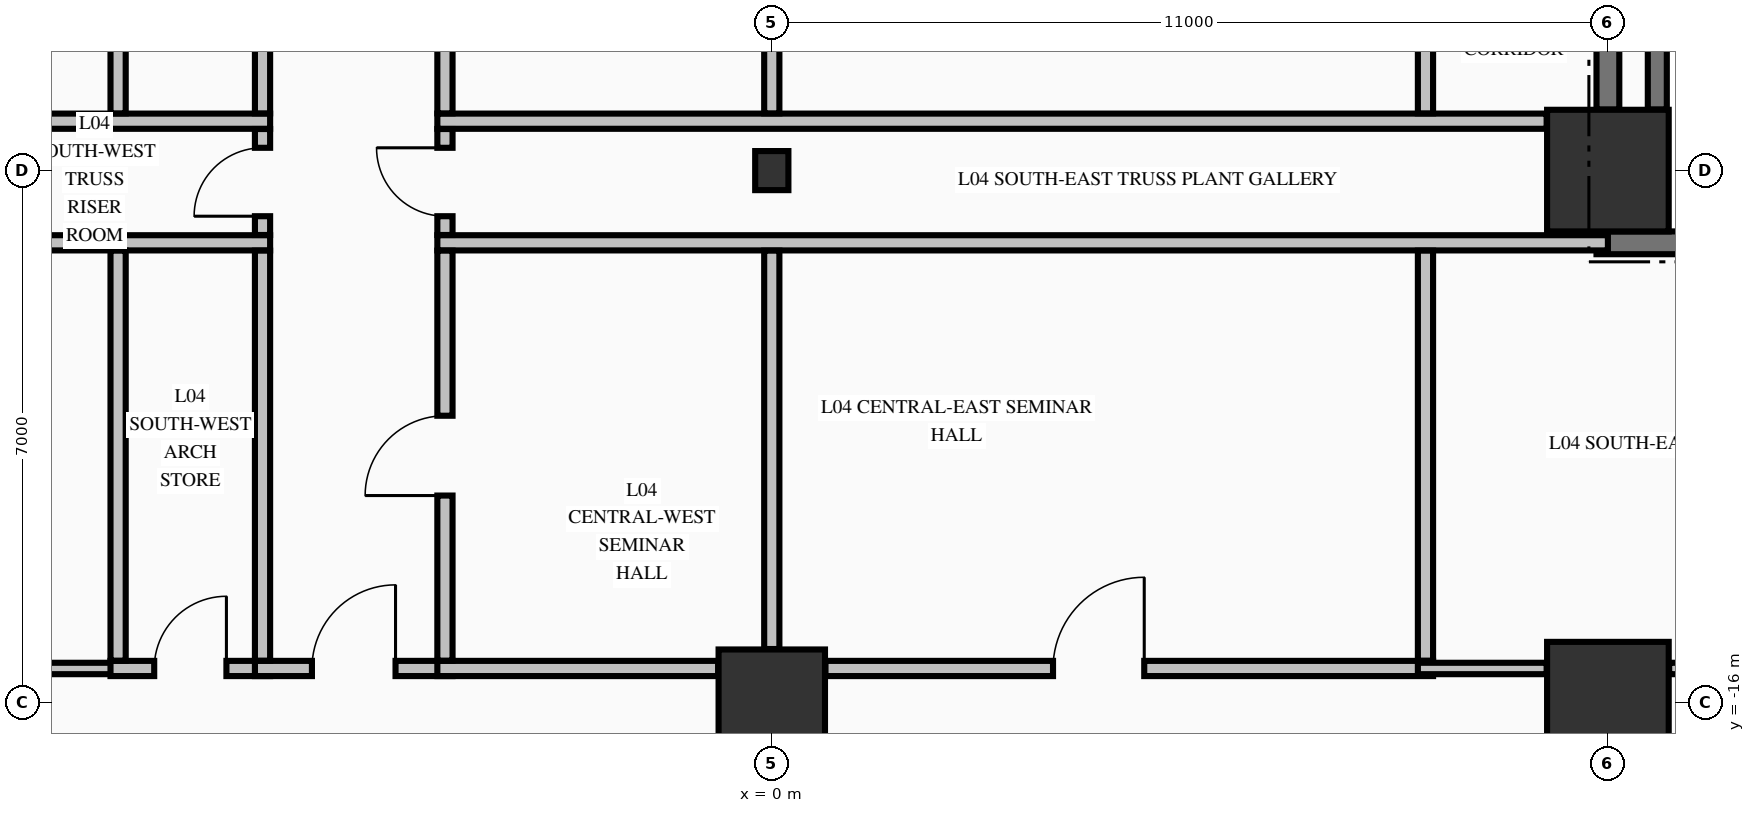
"""IFC4 building model, lengths in metres.
Left out: names, types, materials, properties, quantities, classifications, styles, units other than length and angle.
Written with IfcOpenShell. Run it as: python <this file> out.ifc"""

import sys

from ifc_helpers import new_model, si_unit, direction, frame, frame_2d, origin, origin_2d, place, context, subcontext, project, spatial, rectangle, i_section, extrude, element, fill, save


model = new_model("IFC4")
c1 = context("Model", 3, precision=1e-05, world=origin(), true_north=direction((0.0, 1.0)))
c2 = subcontext(c1, "Body", "Model", "MODEL_VIEW")
j1 = project(units=[si_unit("LENGTHUNIT", "METRE"), si_unit("PLANEANGLEUNIT", "RADIAN")], contexts=[c1])
p1 = place(None, origin())
s1 = spatial("IfcSite", under=j1, at=p1, CompositionType="ELEMENT")
p2 = place(p1, origin())
s2 = spatial("IfcBuilding", under=s1, at=p2, CompositionType="ELEMENT")
p3 = place(p2, frame((0.0, 0.0, 21.76)))
s3 = spatial("IfcBuildingStorey", under=s2, at=p3, CompositionType="ELEMENT", Elevation=21.76)
p4 = place(p3, frame((0.0, -16.0, -0.45), z_axis=(0.0, 0.0, 1.0), x_axis=(1.0, 0.0, 0.0)))
e1 = element("IfcColumn", 1, at=p4, inside=s3, PredefinedType="COLUMN", context=c2, shape_type="SweptSolid", body=[
    extrude(rectangle(XDim=1.4, YDim=1.4, at=origin_2d()), origin(), (0.0, 0.0, 1.0), 5.44),
])
p5 = place(p3, frame((0.0, -9.0, -0.45), z_axis=(0.0, 0.0, 1.0), x_axis=(1.0, 0.0, 0.0)))
e2 = element("IfcColumn", 2, at=p5, inside=s3, PredefinedType="COLUMN", context=c2, shape_type="SweptSolid", body=[
    extrude(i_section(OverallWidth=0.437, OverallDepth=0.514, WebThickness=0.061, FlangeThickness=0.097, FilletRadius=0.015, at=origin_2d()), origin(), (0.0, 0.0, 1.0), 5.44),
])
for number, where, z_axis, x_axis in (
    (3, (11.0, -16.0, -0.45), (0.0, 0.0, 1.0), (1.0, 0.0, 0.0)),
    (4, (11.0, -9.0, -0.45), (0.0, 0.0, 1.0), (1.0, 0.0, 0.0)),
):
    element("IfcColumn", number, at=place(p3, frame(where, z_axis=z_axis, x_axis=x_axis)), inside=s3, PredefinedType="COLUMN", context=c2, shape_type="SweptSolid", body=[
        extrude(rectangle(XDim=1.6, YDim=1.6, at=origin_2d()), origin(), (0.0, 0.0, 1.0), 5.44),
    ])
p6 = place(p3, frame((10.85, -9.95, 0.0), z_axis=(0.0, 0.0, 1.0), x_axis=(1.0, 0.0, 0.0)))
e5 = element("IfcWall", 5, at=p6, inside=s3, PredefinedType="SHEAR", context=c2, shape_type="SweptSolid", body=[
    extrude(rectangle(XDim=3.85, YDim=0.3, at=frame_2d((1.925, 0.0))), origin(), (0.0, 0.0, 1.0), 4.99),
])
p7 = place(p3, frame((-10.194, -15.55, 0.0), z_axis=(0.0, 0.0, 1.0), x_axis=(1.0, 0.0, 0.0)))
e6 = element("IfcWall", 6, at=p7, inside=s3, PredefinedType="PARTITIONING", context=c2, shape_type="SweptSolid", body=[
    extrude(rectangle(XDim=1.694, YDim=0.15, at=frame_2d((0.847, 0.0))), origin(), (0.0, 0.0, 1.0), 3.332),
])
p8 = place(p3, frame((-8.7, -15.55, 0.0), z_axis=(0.0, 0.0, 1.0), x_axis=(1.0, 0.0, 0.0)))
e7 = element("IfcWall", 7, at=p8, inside=s3, PredefinedType="PARTITIONING", context=c2, shape_type="SweptSolid", body=[
    extrude(rectangle(XDim=2.1, YDim=0.2, at=frame_2d((1.05, 0.0))), origin(), (0.0, 0.0, 1.0), 3.332),
])
p9 = place(p8, frame((0.575, 0.0, 0.0)))
e8 = element("IfcOpeningElement", 8, at=p9, cuts=e7, PredefinedType="OPENING", context=c2, shape_type="SweptSolid", body=[
    extrude(rectangle(XDim=0.95, YDim=2.15, at=frame_2d((0.475, 1.075))), frame((0.0, 0.11, 0.0), z_axis=(0.0, -1.0, 0.0), x_axis=(1.0, 0.0, 0.0)), (0.0, 0.0, 1.0), 0.22),
])
p10 = place(p3, frame((-6.8, -15.55, 0.0), z_axis=(0.0, 0.0, 1.0), x_axis=(1.0, 0.0, 0.0)))
e9 = element("IfcWall", 9, at=p10, inside=s3, PredefinedType="PARTITIONING", context=c2, shape_type="SweptSolid", body=[
    extrude(rectangle(XDim=2.6, YDim=0.2, at=frame_2d((1.3, 0.0))), origin(), (0.0, 0.0, 1.0), 3.332),
])
p11 = place(p10, frame((0.75, 0.0, 0.0)))
e10 = element("IfcOpeningElement", 10, at=p11, cuts=e9, PredefinedType="OPENING", context=c2, shape_type="SweptSolid", body=[
    extrude(rectangle(XDim=1.1, YDim=2.15, at=frame_2d((0.55, 1.075))), frame((0.0, 0.11, 0.0), z_axis=(0.0, -1.0, 0.0), x_axis=(1.0, 0.0, 0.0)), (0.0, 0.0, 1.0), 0.22),
])
p12 = place(p3, frame((-4.4, -15.55, 0.0), z_axis=(0.0, 0.0, 1.0), x_axis=(1.0, 0.0, 0.0)))
e11 = element("IfcWall", 11, at=p12, inside=s3, PredefinedType="PARTITIONING", context=c2, shape_type="SweptSolid", body=[
    extrude(rectangle(XDim=3.694, YDim=0.2, at=frame_2d((1.847, 0.0))), origin(), (0.0, 0.0, 1.0), 3.332),
])
p13 = place(p3, frame((0.706, -15.55, 0.0), z_axis=(0.0, 0.0, 1.0), x_axis=(1.0, 0.0, 0.0)))
e12 = element("IfcWall", 12, at=p13, inside=s3, PredefinedType="PARTITIONING", context=c2, shape_type="SweptSolid", body=[
    extrude(rectangle(XDim=7.994, YDim=0.2, at=frame_2d((3.997, 0.0))), origin(), (0.0, 0.0, 1.0), 3.332),
])
p14 = place(p13, frame((2.994, 0.0, 0.0)))
e13 = element("IfcOpeningElement", 13, at=p14, cuts=e12, PredefinedType="OPENING", context=c2, shape_type="SweptSolid", body=[
    extrude(rectangle(XDim=1.2, YDim=2.15, at=frame_2d((0.6, 1.075))), frame((0.0, 0.11, 0.0), z_axis=(0.0, -1.0, 0.0), x_axis=(1.0, 0.0, 0.0)), (0.0, 0.0, 1.0), 0.22),
])
p15 = place(p3, frame((8.5, -15.55, 0.0), z_axis=(0.0, 0.0, 1.0), x_axis=(1.0, 0.0, 0.0)))
e14 = element("IfcWall", 14, at=p15, inside=s3, PredefinedType="PARTITIONING", context=c2, shape_type="SweptSolid", body=[
    extrude(rectangle(XDim=1.694, YDim=0.15, at=frame_2d((0.847, 0.0))), origin(), (0.0, 0.0, 1.0), 3.332),
])
p16 = place(p3, frame((11.806, -15.55, 0.0), z_axis=(0.0, 0.0, 1.0), x_axis=(1.0, 0.0, 0.0)))
e15 = element("IfcWall", 15, at=p16, inside=s3, PredefinedType="PARTITIONING", context=c2, shape_type="SweptSolid", body=[
    extrude(rectangle(XDim=7.388, YDim=0.15, at=frame_2d((3.694, 0.0))), origin(), (0.0, 0.0, 1.0), 3.332),
])
p17 = place(p16, frame((3.094, 0.0, 0.0)))
e16 = element("IfcOpeningElement", 16, at=p17, cuts=e15, PredefinedType="OPENING", context=c2, shape_type="SweptSolid", body=[
    extrude(rectangle(XDim=1.2, YDim=2.15, at=frame_2d((0.6, 1.075))), frame((0.0, 0.085, 0.0), z_axis=(0.0, -1.0, 0.0), x_axis=(1.0, 0.0, 0.0)), (0.0, 0.0, 1.0), 0.17),
])
p18 = place(p3, frame((-11.0, -9.95, 0.0), z_axis=(0.0, 0.0, 1.0), x_axis=(1.0, 0.0, 0.0)))
e17 = element("IfcWall", 17, at=p18, inside=s3, PredefinedType="PARTITIONING", context=c2, shape_type="SweptSolid", body=[
    extrude(rectangle(XDim=4.4, YDim=0.2, at=frame_2d((2.2, 0.0))), origin(), (0.0, 0.0, 1.0), 3.332),
])
p19 = place(p3, frame((-4.4, -9.95, 0.0), z_axis=(0.0, 0.0, 1.0), x_axis=(1.0, 0.0, 0.0)))
e18 = element("IfcWall", 18, at=p19, inside=s3, PredefinedType="PARTITIONING", context=c2, shape_type="SweptSolid", body=[
    extrude(rectangle(XDim=15.4, YDim=0.2, at=frame_2d((7.7, 0.0))), origin(), (0.0, 0.0, 1.0), 3.332),
])
p20 = place(p3, frame((-10.194, -8.35, 0.0), z_axis=(0.0, 0.0, 1.0), x_axis=(1.0, 0.0, 0.0)))
e19 = element("IfcWall", 19, at=p20, inside=s3, PredefinedType="PARTITIONING", context=c2, shape_type="SweptSolid", body=[
    extrude(rectangle(XDim=3.594, YDim=0.2, at=frame_2d((1.797, 0.0))), origin(), (0.0, 0.0, 1.0), 3.332),
])
p21 = place(p3, frame((-4.4, -8.35, 0.0), z_axis=(0.0, 0.0, 1.0), x_axis=(1.0, 0.0, 0.0)))
e20 = element("IfcWall", 20, at=p21, inside=s3, PredefinedType="PARTITIONING", context=c2, shape_type="SweptSolid", body=[
    extrude(rectangle(XDim=14.594, YDim=0.2, at=frame_2d((7.297, 0.0))), origin(), (0.0, 0.0, 1.0), 3.332),
])
p22 = place(p3, frame((11.0, -8.196, 0.0), z_axis=(0.0, 0.0, 1.0), x_axis=(0.0, 1.0, 0.0)))
e21 = element("IfcWall", 21, at=p22, inside=s3, PredefinedType="SHEAR", context=c2, shape_type="SweptSolid", body=[
    extrude(rectangle(XDim=7.392, YDim=0.3, at=frame_2d((3.696, 0.0))), origin(), (0.0, 0.0, 1.0), 4.99),
])
p23 = place(p3, frame((11.65, -8.196, 0.0), z_axis=(0.0, 0.0, 1.0), x_axis=(0.0, 1.0, 0.0)))
e22 = element("IfcWall", 22, at=p23, inside=s3, PredefinedType="SOLIDWALL", context=c2, shape_type="SweptSolid", body=[
    extrude(rectangle(XDim=7.392, YDim=0.25, at=frame_2d((3.696, 0.0))), origin(), (0.0, 0.0, 1.0), 4.99),
])
p24 = place(p3, frame((-8.6, -15.447, 0.0), z_axis=(0.0, 0.0, 1.0), x_axis=(0.0, 1.0, 0.0)))
e23 = element("IfcWall", 23, at=p24, inside=s3, PredefinedType="PARTITIONING", context=c2, shape_type="SweptSolid", body=[
    extrude(rectangle(XDim=5.394, YDim=0.2, at=frame_2d((2.697, 0.0))), origin(), (0.0, 0.0, 1.0), 4.99),
])
p25 = place(p3, frame((-8.6, -8.247, 0.0), z_axis=(0.0, 0.0, 1.0), x_axis=(0.0, 1.0, 0.0)))
e24 = element("IfcWall", 24, at=p25, inside=s3, PredefinedType="PARTITIONING", context=c2, shape_type="SweptSolid", body=[
    extrude(rectangle(XDim=10.694, YDim=0.2, at=frame_2d((5.347, 0.0))), origin(), (0.0, 0.0, 1.0), 4.99),
])
p26 = place(p25, frame((4.772, 0.0, 0.0)))
e25 = element("IfcOpeningElement", 25, at=p26, cuts=e24, PredefinedType="OPENING", context=c2, shape_type="SweptSolid", body=[
    extrude(rectangle(XDim=0.95, YDim=2.15, at=frame_2d((0.475, 1.075))), frame((0.0, 0.11, 0.0), z_axis=(0.0, -1.0, 0.0), x_axis=(1.0, 0.0, 0.0)), (0.0, 0.0, 1.0), 0.22),
])
p27 = place(p3, frame((-6.7, -15.447, 0.0), z_axis=(0.0, 0.0, 1.0), x_axis=(0.0, 1.0, 0.0)))
e26 = element("IfcWall", 26, at=p27, inside=s3, PredefinedType="PARTITIONING", context=c2, shape_type="SweptSolid", body=[
    extrude(rectangle(XDim=5.394, YDim=0.2, at=frame_2d((2.697, 0.0))), origin(), (0.0, 0.0, 1.0), 4.99),
])
p28 = place(p3, frame((-6.7, -9.847, 0.0), z_axis=(0.0, 0.0, 1.0), x_axis=(0.0, 1.0, 0.0)))
e27 = element("IfcWall", 27, at=p28, inside=s3, PredefinedType="PARTITIONING", context=c2, shape_type="SweptSolid", body=[
    extrude(rectangle(XDim=1.394, YDim=0.2, at=frame_2d((0.697, 0.0))), origin(), (0.0, 0.0, 1.0), 4.99),
])
p29 = place(p28, frame((0.247, 0.0, 0.0)))
e28 = element("IfcOpeningElement", 28, at=p29, cuts=e27, PredefinedType="OPENING", context=c2, shape_type="SweptSolid", body=[
    extrude(rectangle(XDim=0.9, YDim=2.15, at=frame_2d((0.45, 1.075))), frame((0.0, 0.11, 0.0), z_axis=(0.0, -1.0, 0.0), x_axis=(1.0, 0.0, 0.0)), (0.0, 0.0, 1.0), 0.22),
])
p30 = place(p3, frame((-6.7, -8.247, 0.0), z_axis=(0.0, 0.0, 1.0), x_axis=(0.0, 1.0, 0.0)))
e29 = element("IfcWall", 29, at=p30, inside=s3, PredefinedType="PARTITIONING", context=c2, shape_type="SweptSolid", body=[
    extrude(rectangle(XDim=10.694, YDim=0.2, at=frame_2d((5.347, 0.0))), origin(), (0.0, 0.0, 1.0), 4.99),
])
p31 = place(p3, frame((-4.3, -15.447, 0.0), z_axis=(0.0, 0.0, 1.0), x_axis=(0.0, 1.0, 0.0)))
e30 = element("IfcWall", 30, at=p31, inside=s3, PredefinedType="PARTITIONING", context=c2, shape_type="SweptSolid", body=[
    extrude(rectangle(XDim=5.394, YDim=0.2, at=frame_2d((2.697, 0.0))), origin(), (0.0, 0.0, 1.0), 4.99),
])
p32 = place(p31, frame((2.172, 0.0, 0.0)))
e31 = element("IfcOpeningElement", 31, at=p32, cuts=e30, PredefinedType="OPENING", context=c2, shape_type="SweptSolid", body=[
    extrude(rectangle(XDim=1.05, YDim=2.15, at=frame_2d((0.525, 1.075))), frame((0.0, 0.11, 0.0), z_axis=(0.0, -1.0, 0.0), x_axis=(1.0, 0.0, 0.0)), (0.0, 0.0, 1.0), 0.22),
])
p33 = place(p3, frame((-4.3, -9.847, 0.0), z_axis=(0.0, 0.0, 1.0), x_axis=(0.0, 1.0, 0.0)))
e32 = element("IfcWall", 32, at=p33, inside=s3, PredefinedType="PARTITIONING", context=c2, shape_type="SweptSolid", body=[
    extrude(rectangle(XDim=1.394, YDim=0.2, at=frame_2d((0.697, 0.0))), origin(), (0.0, 0.0, 1.0), 4.99),
])
p34 = place(p33, frame((0.247, 0.0, 0.0)))
e33 = element("IfcOpeningElement", 33, at=p34, cuts=e32, PredefinedType="OPENING", context=c2, shape_type="SweptSolid", body=[
    extrude(rectangle(XDim=0.9, YDim=2.15, at=frame_2d((0.45, 1.075))), frame((0.0, 0.11, 0.0), z_axis=(0.0, -1.0, 0.0), x_axis=(1.0, 0.0, 0.0)), (0.0, 0.0, 1.0), 0.22),
])
p35 = place(p3, frame((-4.3, -8.247, 0.0), z_axis=(0.0, 0.0, 1.0), x_axis=(0.0, 1.0, 0.0)))
e34 = element("IfcWall", 34, at=p35, inside=s3, PredefinedType="PARTITIONING", context=c2, shape_type="SweptSolid", body=[
    extrude(rectangle(XDim=10.694, YDim=0.2, at=frame_2d((5.347, 0.0))), origin(), (0.0, 0.0, 1.0), 4.99),
])
p36 = place(p3, frame((0.0, -15.294, 0.0), z_axis=(0.0, 0.0, 1.0), x_axis=(0.0, 1.0, 0.0)))
e35 = element("IfcWall", 35, at=p36, inside=s3, PredefinedType="PARTITIONING", context=c2, shape_type="SweptSolid", body=[
    extrude(rectangle(XDim=5.241, YDim=0.2, at=frame_2d((2.621, 0.0))), origin(), (0.0, 0.0, 1.0), 3.332),
])
p37 = place(p3, frame((0.0, -8.247, 0.0), z_axis=(0.0, 0.0, 1.0), x_axis=(0.0, 1.0, 0.0)))
e36 = element("IfcWall", 36, at=p37, inside=s3, PredefinedType="PARTITIONING", context=c2, shape_type="SweptSolid", body=[
    extrude(rectangle(XDim=7.541, YDim=0.2, at=frame_2d((3.771, 0.0))), origin(), (0.0, 0.0, 1.0), 3.332),
])
p38 = place(p3, frame((8.6, -15.447, 0.0), z_axis=(0.0, 0.0, 1.0), x_axis=(0.0, 1.0, 0.0)))
e37 = element("IfcWall", 37, at=p38, inside=s3, PredefinedType="PARTITIONING", context=c2, shape_type="SweptSolid", body=[
    extrude(rectangle(XDim=5.394, YDim=0.2, at=frame_2d((2.697, 0.0))), origin(), (0.0, 0.0, 1.0), 4.99),
])
p39 = place(p3, frame((8.6, -8.247, 0.0), z_axis=(0.0, 0.0, 1.0), x_axis=(0.0, 1.0, 0.0)))
e38 = element("IfcWall", 38, at=p39, inside=s3, PredefinedType="PARTITIONING", context=c2, shape_type="SweptSolid", body=[
    extrude(rectangle(XDim=10.694, YDim=0.2, at=frame_2d((5.347, 0.0))), origin(), (0.0, 0.0, 1.0), 4.99),
])
p40 = place(p39, frame((4.547, 0.0, 0.0)))
e39 = element("IfcOpeningElement", 39, at=p40, cuts=e38, PredefinedType="OPENING", context=c2, shape_type="SweptSolid", body=[
    extrude(rectangle(XDim=1.4, YDim=2.2, at=frame_2d((0.7, 1.1))), frame((0.0, 0.11, 0.0), z_axis=(0.0, -1.0, 0.0), x_axis=(1.0, 0.0, 0.0)), (0.0, 0.0, 1.0), 0.22),
])
p41 = place(p11, origin())
e40 = element("IfcDoor", 40, at=p41, inside=s3, OperationType="SINGLE_SWING_RIGHT", PredefinedType="DOOR", context=c2, shape_type="SweptSolid", body=[
    extrude(rectangle(XDim=1.1, YDim=2.15, at=frame_2d((0.55, 1.075))), frame((0.0, 0.025, 0.0), z_axis=(0.0, -1.0, 0.0), x_axis=(1.0, 0.0, 0.0)), (0.0, 0.0, 1.0), 0.05),
])
fill(e10, e40)
p42 = place(p9, origin())
e41 = element("IfcDoor", 41, at=p42, inside=s3, OperationType="SINGLE_SWING_RIGHT", PredefinedType="DOOR", context=c2, shape_type="SweptSolid", body=[
    extrude(rectangle(XDim=0.95, YDim=2.15, at=frame_2d((0.475, 1.075))), frame((0.0, 0.025, 0.0), z_axis=(0.0, -1.0, 0.0), x_axis=(1.0, 0.0, 0.0)), (0.0, 0.0, 1.0), 0.05),
])
fill(e8, e41)
p43 = place(p32, origin())
e42 = element("IfcDoor", 42, at=p43, inside=s3, OperationType="SINGLE_SWING_LEFT", PredefinedType="DOOR", context=c2, shape_type="SweptSolid", body=[
    extrude(rectangle(XDim=1.05, YDim=2.15, at=frame_2d((0.525, 1.075))), frame((0.0, 0.025, 0.0), z_axis=(0.0, -1.0, 0.0), x_axis=(1.0, 0.0, 0.0)), (0.0, 0.0, 1.0), 0.05),
])
fill(e31, e42)
p44 = place(p14, origin())
e43 = element("IfcDoor", 43, at=p44, inside=s3, OperationType="SINGLE_SWING_RIGHT", PredefinedType="DOOR", context=c2, shape_type="SweptSolid", body=[
    extrude(rectangle(XDim=1.2, YDim=2.15, at=frame_2d((0.6, 1.075))), frame((0.0, 0.025, 0.0), z_axis=(0.0, -1.0, 0.0), x_axis=(1.0, 0.0, 0.0)), (0.0, 0.0, 1.0), 0.05),
])
fill(e13, e43)
p45 = place(p29, origin())
e44 = element("IfcDoor", 44, at=p45, inside=s3, OperationType="SINGLE_SWING_LEFT", PredefinedType="DOOR", context=c2, shape_type="SweptSolid", body=[
    extrude(rectangle(XDim=0.9, YDim=2.15, at=frame_2d((0.45, 1.075))), frame((0.0, 0.025, 0.0), z_axis=(0.0, -1.0, 0.0), x_axis=(1.0, 0.0, 0.0)), (0.0, 0.0, 1.0), 0.05),
])
fill(e28, e44)
p46 = place(p34, origin())
e45 = element("IfcDoor", 45, at=p46, inside=s3, OperationType="SINGLE_SWING_RIGHT", PredefinedType="DOOR", context=c2, shape_type="SweptSolid", body=[
    extrude(rectangle(XDim=0.9, YDim=2.15, at=frame_2d((0.45, 1.075))), frame((0.0, 0.025, 0.0), z_axis=(0.0, -1.0, 0.0), x_axis=(1.0, 0.0, 0.0)), (0.0, 0.0, 1.0), 0.05),
])
fill(e33, e45)
save(model, sys.argv[1])
